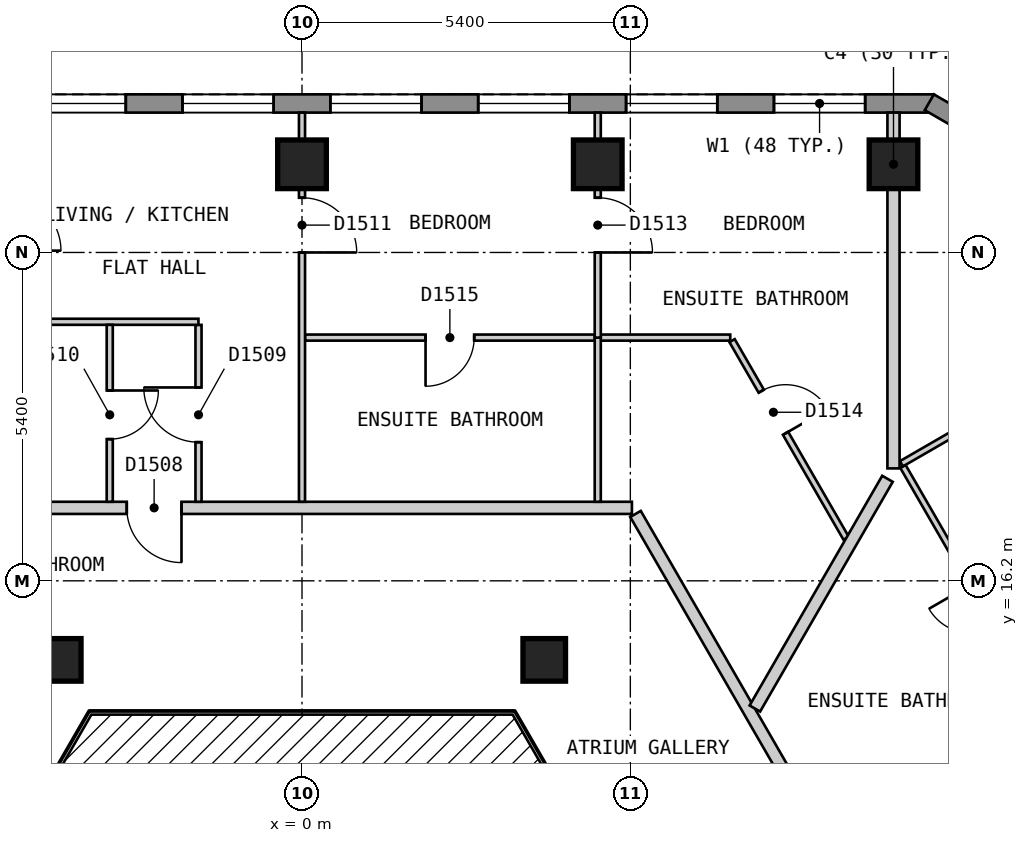
"""IFC4 building model, lengths in metres.
Left out: names, types, materials, properties, quantities, classifications, styles, units other than length and angle.
Written with IfcOpenShell. Run it as: python <this file> out.ifc"""

import sys

from ifc_helpers import new_model, si_unit, direction, frame, frame_2d, origin, origin_2d, place, context, subcontext, project, spatial, polyline, rectangle, outline, extrude, element, fill, save


model = new_model("IFC4")
c1 = context("Model", 3, precision=1e-05, world=origin(), true_north=direction((0.0, 1.0)))
c2 = subcontext(c1, "Body", "Model", "MODEL_VIEW")
j1 = project(units=[si_unit("LENGTHUNIT", "METRE"), si_unit("PLANEANGLEUNIT", "RADIAN")], contexts=[c1])
p1 = place(None, origin())
s1 = spatial("IfcSite", under=j1, at=p1, CompositionType="ELEMENT")
p2 = place(p1, origin())
s2 = spatial("IfcBuilding", under=s1, at=p2, CompositionType="ELEMENT")
p3 = place(p2, frame((0.0, 0.0, 190.2)))
s3 = spatial("IfcBuildingStorey", under=s2, at=p3, CompositionType="ELEMENT", Elevation=190.2)
for number, where, z_axis, x_axis in (
    (1, (9.728, 23.05, 0.0), (0.0, 0.0, 1.0), (-1.0, 0.0, 0.0)),
    (2, (4.864, 23.05, 0.0), (0.0, 0.0, 1.0), (-1.0, 0.0, 0.0)),
    (3, (0.0, 23.05, 0.0), (0.0, 0.0, 1.0), (-1.0, 0.0, 0.0)),
):
    element("IfcColumn", number, at=place(p3, frame(where, z_axis=z_axis, x_axis=x_axis)), inside=s3, PredefinedType="COLUMN", context=c2, shape_type="SweptSolid", body=[
        extrude(rectangle(XDim=0.8, YDim=0.8, at=origin_2d()), origin(), (0.0, 0.0, 1.0), 3.0),
    ])
for number, where, z_axis, x_axis in (
    (4, (3.984, 14.9, 0.0), (0.0, 0.0, 1.0), (1.0, 0.0, 0.0)),
    (5, (-3.984, 14.9, 0.0), (0.0, 0.0, 1.0), (1.0, 0.0, 0.0)),
):
    element("IfcColumn", number, at=place(p3, frame(where, z_axis=z_axis, x_axis=x_axis)), inside=s3, PredefinedType="COLUMN", context=c2, shape_type="SweptSolid", body=[
        extrude(rectangle(XDim=0.7, YDim=0.7, at=origin_2d()), origin(), (0.0, 0.0, 1.0), 3.0),
    ])
p4 = place(p3, frame((10.392, 24.05, 0.0), z_axis=(0.0, 0.0, 1.0), x_axis=(-1.0, 0.0, 0.0)))
e6 = element("IfcWall", 6, at=p4, inside=s3, PredefinedType="SOLIDWALL", context=c2, shape_type="SweptSolid", body=[
    extrude(outline(polyline([(0.0, -0.15), (20.784, -0.15), (20.704, 0.15), (0.08, 0.15), (0.0, -0.15)])), origin(), (0.0, 0.0, 1.0), 2.7),
])
p5 = place(p4, frame((1.13, 0.0, 0.15)))
e7 = element("IfcOpeningElement", 7, at=p5, cuts=e6, PredefinedType="OPENING", context=c2, shape_type="SweptSolid", body=[
    extrude(rectangle(XDim=1.5, YDim=2.1, at=frame_2d((0.75, 1.05))), frame((0.0, 0.16, 0.0), z_axis=(0.0, -1.0, 0.0), x_axis=(1.0, 0.0, 0.0)), (0.0, 0.0, 1.0), 0.32),
])
p6 = place(p4, frame((3.562, 0.0, 0.15)))
e8 = element("IfcOpeningElement", 8, at=p6, cuts=e6, PredefinedType="OPENING", context=c2, shape_type="SweptSolid", body=[
    extrude(rectangle(XDim=1.5, YDim=2.1, at=frame_2d((0.75, 1.05))), frame((0.0, 0.16, 0.0), z_axis=(0.0, -1.0, 0.0), x_axis=(1.0, 0.0, 0.0)), (0.0, 0.0, 1.0), 0.32),
])
p7 = place(p4, frame((5.994, 0.0, 0.15)))
e9 = element("IfcOpeningElement", 9, at=p7, cuts=e6, PredefinedType="OPENING", context=c2, shape_type="SweptSolid", body=[
    extrude(rectangle(XDim=1.5, YDim=2.1, at=frame_2d((0.75, 1.05))), frame((0.0, 0.16, 0.0), z_axis=(0.0, -1.0, 0.0), x_axis=(1.0, 0.0, 0.0)), (0.0, 0.0, 1.0), 0.32),
])
p8 = place(p4, frame((8.426, 0.0, 0.15)))
e10 = element("IfcOpeningElement", 10, at=p8, cuts=e6, PredefinedType="OPENING", context=c2, shape_type="SweptSolid", body=[
    extrude(rectangle(XDim=1.5, YDim=2.1, at=frame_2d((0.75, 1.05))), frame((0.0, 0.16, 0.0), z_axis=(0.0, -1.0, 0.0), x_axis=(1.0, 0.0, 0.0)), (0.0, 0.0, 1.0), 0.32),
])
p9 = place(p4, frame((10.858, 0.0, 0.15)))
e11 = element("IfcOpeningElement", 11, at=p9, cuts=e6, PredefinedType="OPENING", context=c2, shape_type="SweptSolid", body=[
    extrude(rectangle(XDim=1.5, YDim=2.1, at=frame_2d((0.75, 1.05))), frame((0.0, 0.16, 0.0), z_axis=(0.0, -1.0, 0.0), x_axis=(1.0, 0.0, 0.0)), (0.0, 0.0, 1.0), 0.32),
])
p10 = place(p4, frame((13.29, 0.0, 0.15)))
e12 = element("IfcOpeningElement", 12, at=p10, cuts=e6, PredefinedType="OPENING", context=c2, shape_type="SweptSolid", body=[
    extrude(rectangle(XDim=1.5, YDim=2.1, at=frame_2d((0.75, 1.05))), frame((0.0, 0.16, 0.0), z_axis=(0.0, -1.0, 0.0), x_axis=(1.0, 0.0, 0.0)), (0.0, 0.0, 1.0), 0.32),
])
p11 = place(p4, frame((15.722, 0.0, 0.15)))
e13 = element("IfcOpeningElement", 13, at=p11, cuts=e6, PredefinedType="OPENING", context=c2, shape_type="SweptSolid", body=[
    extrude(rectangle(XDim=1.5, YDim=2.1, at=frame_2d((0.75, 1.05))), frame((0.0, 0.16, 0.0), z_axis=(0.0, -1.0, 0.0), x_axis=(1.0, 0.0, 0.0)), (0.0, 0.0, 1.0), 0.32),
])
p12 = place(p4, frame((18.154, 0.0, 0.15)))
e14 = element("IfcOpeningElement", 14, at=p12, cuts=e6, PredefinedType="OPENING", context=c2, shape_type="SweptSolid", body=[
    extrude(rectangle(XDim=1.5, YDim=2.1, at=frame_2d((0.75, 1.05))), frame((0.0, 0.16, 0.0), z_axis=(0.0, -1.0, 0.0), x_axis=(1.0, 0.0, 0.0)), (0.0, 0.0, 1.0), 0.32),
])
p13 = place(p3, frame((14.647, 21.57, 0.0), z_axis=(0.0, 0.0, 1.0), x_axis=(-0.866022959057, 0.500004234368, 0.0)))
e15 = element("IfcWall", 15, at=p13, inside=s3, PredefinedType="SOLIDWALL", context=c2, shape_type="SweptSolid", body=[
    extrude(outline(polyline([(0.0, -0.15), (5.0, -0.15), (4.92, 0.15), (0.08, 0.15), (0.0, -0.15)])), origin(), (0.0, 0.0, 1.0), 2.7),
])
p14 = place(p13, frame((0.65, 0.0, 0.15)))
e16 = element("IfcOpeningElement", 16, at=p14, cuts=e15, PredefinedType="OPENING", context=c2, shape_type="SweptSolid", body=[
    extrude(rectangle(XDim=1.2, YDim=2.1, at=frame_2d((0.6, 1.05))), frame((0.0, 0.16, 0.0), z_axis=(0.0, -1.0, 0.0), x_axis=(1.0, 0.0, 0.0)), (0.0, 0.0, 1.0), 0.32),
])
p15 = place(p13, frame((3.15, 0.0, 0.15)))
e17 = element("IfcOpeningElement", 17, at=p15, cuts=e15, PredefinedType="OPENING", context=c2, shape_type="SweptSolid", body=[
    extrude(rectangle(XDim=1.2, YDim=2.1, at=frame_2d((0.6, 1.05))), frame((0.0, 0.16, 0.0), z_axis=(0.0, -1.0, 0.0), x_axis=(1.0, 0.0, 0.0)), (0.0, 0.0, 1.0), 0.32),
])
p16 = place(p3, frame((5.485, 17.3, 0.0), z_axis=(0.0, 0.0, 1.0), x_axis=(0.499998905622, -0.866026035623, 0.0)))
e18 = element("IfcWall", 18, at=p16, inside=s3, PredefinedType="PARTITIONING", context=c2, shape_type="SweptSolid", body=[
    extrude(rectangle(XDim=10.524, YDim=0.2, at=frame_2d((5.262, 0.0))), origin(), (0.0, 0.0, 1.0), 2.7),
])
p17 = place(p16, frame((8.974, 0.0, 0.0)))
e19 = element("IfcOpeningElement", 19, at=p17, cuts=e18, PredefinedType="OPENING", context=c2, shape_type="SweptSolid", body=[
    extrude(rectangle(XDim=1.0, YDim=2.1, at=frame_2d((0.5, 1.05))), frame((0.0, 0.11, 0.0), z_axis=(0.0, -1.0, 0.0), x_axis=(1.0, 0.0, 0.0)), (0.0, 0.0, 1.0), 0.22),
])
p18 = place(p3, frame((-5.311, 17.4, 0.0), z_axis=(0.0, 0.0, 1.0), x_axis=(1.0, 0.0, 0.0)))
e20 = element("IfcWall", 20, at=p18, inside=s3, PredefinedType="PARTITIONING", context=c2, shape_type="SweptSolid", body=[
    extrude(rectangle(XDim=10.737, YDim=0.2, at=frame_2d((5.369, 0.0))), origin(), (0.0, 0.0, 1.0), 2.7),
])
p19 = place(p18, frame((2.429, 0.0, 0.0)))
e21 = element("IfcOpeningElement", 21, at=p19, cuts=e20, PredefinedType="OPENING", context=c2, shape_type="SweptSolid", body=[
    extrude(rectangle(XDim=0.9, YDim=2.1, at=frame_2d((0.45, 1.05))), frame((0.0, 0.11, 0.0), z_axis=(0.0, -1.0, 0.0), x_axis=(1.0, 0.0, 0.0)), (0.0, 0.0, 1.0), 0.22),
])
p20 = place(p3, frame((7.073, 20.15, 0.0), z_axis=(0.0, 0.0, 1.0), x_axis=(0.499917691695, -0.866072919292, 0.0)))
e22 = element("IfcWall", 22, at=p20, inside=s3, PredefinedType="PARTITIONING", context=c2, shape_type="SweptSolid", body=[
    extrude(rectangle(XDim=3.753, YDim=0.1, at=frame_2d((1.876, 0.0))), origin(), (0.0, 0.0, 1.0), 2.7),
])
p21 = place(p20, frame((0.96, 0.0, 0.0)))
e23 = element("IfcOpeningElement", 23, at=p21, cuts=e22, PredefinedType="OPENING", context=c2, shape_type="SweptSolid", body=[
    extrude(rectangle(XDim=0.8, YDim=2.1, at=frame_2d((0.4, 1.05))), frame((0.0, 0.06, 0.0), z_axis=(0.0, -1.0, 0.0), x_axis=(1.0, 0.0, 0.0)), (0.0, 0.0, 1.0), 0.12),
])
p22 = place(p3, frame((9.883, 18.082, 0.0), z_axis=(0.0, 0.0, 1.0), x_axis=(0.500004428835, -0.86602284678, 0.0)))
e24 = element("IfcWall", 24, at=p22, inside=s3, PredefinedType="PARTITIONING", context=c2, shape_type="SweptSolid", body=[
    extrude(rectangle(XDim=10.618, YDim=0.1, at=frame_2d((5.309, 0.0))), origin(), (0.0, 0.0, 1.0), 2.7),
])
p23 = place(p22, frame((7.657, 0.0, 0.0)))
e25 = element("IfcOpeningElement", 25, at=p23, cuts=e24, PredefinedType="OPENING", context=c2, shape_type="SweptSolid", body=[
    extrude(rectangle(XDim=0.9, YDim=2.1, at=frame_2d((0.45, 1.05))), frame((0.0, 0.06, 0.0), z_axis=(0.0, -1.0, 0.0), x_axis=(1.0, 0.0, 0.0)), (0.0, 0.0, 1.0), 0.12),
])
p24 = place(p22, frame((2.242, 0.0, 0.0)))
e26 = element("IfcOpeningElement", 26, at=p24, cuts=e24, PredefinedType="OPENING", context=c2, shape_type="SweptSolid", body=[
    extrude(rectangle(XDim=0.8, YDim=2.1, at=frame_2d((0.4, 1.05))), frame((0.0, 0.06, 0.0), z_axis=(0.0, -1.0, 0.0), x_axis=(1.0, 0.0, 0.0)), (0.0, 0.0, 1.0), 0.12),
])
p25 = place(p3, frame((-1.702, 20.409, 0.0), z_axis=(0.0, 0.0, 1.0), x_axis=(0.0, -1.0, 0.0)))
e27 = element("IfcWall", 27, at=p25, inside=s3, PredefinedType="PARTITIONING", context=c2, shape_type="SweptSolid", body=[
    extrude(rectangle(XDim=2.909, YDim=0.1, at=frame_2d((1.455, 0.0))), origin(), (0.0, 0.0, 1.0), 2.7),
])
p26 = place(p25, frame((1.029, 0.0, 0.0)))
e28 = element("IfcOpeningElement", 28, at=p26, cuts=e27, PredefinedType="OPENING", context=c2, shape_type="SweptSolid", body=[
    extrude(rectangle(XDim=0.9, YDim=2.1, at=frame_2d((0.45, 1.05))), frame((0.0, 0.06, 0.0), z_axis=(0.0, -1.0, 0.0), x_axis=(1.0, 0.0, 0.0)), (0.0, 0.0, 1.0), 0.12),
])
p27 = place(p3, frame((0.05, 20.2, 0.0), z_axis=(0.0, 0.0, 1.0), x_axis=(1.0, 0.0, 0.0)))
e29 = element("IfcWall", 29, at=p27, inside=s3, PredefinedType="PARTITIONING", context=c2, shape_type="SweptSolid", body=[
    extrude(rectangle(XDim=6.993, YDim=0.1, at=frame_2d((3.497, 0.0))), origin(), (0.0, 0.0, 1.0), 2.7),
])
p28 = place(p27, frame((1.982, 0.0, 0.0)))
e30 = element("IfcOpeningElement", 30, at=p28, cuts=e29, PredefinedType="OPENING", context=c2, shape_type="SweptSolid", body=[
    extrude(rectangle(XDim=0.8, YDim=2.1, at=frame_2d((0.4, 1.05))), frame((0.0, 0.06, 0.0), z_axis=(0.0, -1.0, 0.0), x_axis=(1.0, 0.0, 0.0)), (0.0, 0.0, 1.0), 0.12),
])
p29 = place(p3, frame((-4.814, 20.46, 0.0), z_axis=(0.0, 0.0, 1.0), x_axis=(1.0, 0.0, 0.0)))
e31 = element("IfcWall", 31, at=p29, inside=s3, PredefinedType="PARTITIONING", context=c2, shape_type="SweptSolid", body=[
    extrude(rectangle(XDim=3.111, YDim=0.1, at=frame_2d((1.556, 0.0))), origin(), (0.0, 0.0, 1.0), 2.7),
])
p30 = place(p3, frame((4.864, 17.5, 0.0), z_axis=(0.0, 0.0, 1.0), x_axis=(0.0, 1.0, 0.0)))
e32 = element("IfcWall", 32, at=p30, inside=s3, PredefinedType="PARTITIONING", context=c2, shape_type="SweptSolid", body=[
    extrude(rectangle(XDim=2.7, YDim=0.1, at=frame_2d((1.35, 0.0))), origin(), (0.0, 0.0, 1.0), 2.7),
])
p31 = place(p3, frame((0.0, 17.5, 0.0), z_axis=(0.0, 0.0, 1.0), x_axis=(0.0, 1.0, 0.0)))
e33 = element("IfcWall", 33, at=p31, inside=s3, PredefinedType="PARTITIONING", context=c2, shape_type="SweptSolid", body=[
    extrude(rectangle(XDim=6.4, YDim=0.1, at=frame_2d((3.2, 0.0))), origin(), (0.0, 0.0, 1.0), 2.7),
])
p32 = place(p31, frame((4.1, 0.0, 0.0)))
e34 = element("IfcOpeningElement", 34, at=p32, cuts=e33, PredefinedType="OPENING", context=c2, shape_type="SweptSolid", body=[
    extrude(rectangle(XDim=0.9, YDim=2.1, at=frame_2d((0.45, 1.05))), frame((0.0, 0.06, 0.0), z_axis=(0.0, -1.0, 0.0), x_axis=(1.0, 0.0, 0.0)), (0.0, 0.0, 1.0), 0.12),
])
p33 = place(p3, frame((-3.162, 17.5, 0.0), z_axis=(0.0, 0.0, 1.0), x_axis=(0.0, 1.0, 0.0)))
e35 = element("IfcWall", 35, at=p33, inside=s3, PredefinedType="PARTITIONING", context=c2, shape_type="SweptSolid", body=[
    extrude(rectangle(XDim=2.91, YDim=0.1, at=frame_2d((1.455, 0.0))), origin(), (0.0, 0.0, 1.0), 2.7),
])
p34 = place(p33, frame((1.03, 0.0, 0.0)))
e36 = element("IfcOpeningElement", 36, at=p34, cuts=e35, PredefinedType="OPENING", context=c2, shape_type="SweptSolid", body=[
    extrude(rectangle(XDim=0.8, YDim=2.1, at=frame_2d((0.4, 1.05))), frame((0.0, 0.06, 0.0), z_axis=(0.0, -1.0, 0.0), x_axis=(1.0, 0.0, 0.0)), (0.0, 0.0, 1.0), 0.12),
])
p35 = place(p3, frame((8.999, 11.413, 0.0), z_axis=(0.0, 0.0, 1.0), x_axis=(0.86606561423, 0.499930346997, 0.0)))
e37 = element("IfcWall", 37, at=p35, inside=s3, PredefinedType="PARTITIONING", context=c2, shape_type="SweptSolid", body=[
    extrude(rectangle(XDim=4.1, YDim=0.1, at=frame_2d((2.05, 0.0))), origin(), (0.0, 0.0, 1.0), 2.7),
])
p36 = place(p3, frame((9.858, 18.125, 0.0), z_axis=(0.0, 0.0, 1.0), x_axis=(0.866004402611, 0.500036373335, 0.0)))
e38 = element("IfcWall", 38, at=p36, inside=s3, PredefinedType="PARTITIONING", context=c2, shape_type="SweptSolid", body=[
    extrude(rectangle(XDim=5.7, YDim=0.1, at=frame_2d((2.85, 0.0))), origin(), (0.0, 0.0, 1.0), 2.7),
])
p37 = place(p36, frame((2.4, 0.0, 0.0)))
e39 = element("IfcOpeningElement", 39, at=p37, cuts=e38, PredefinedType="OPENING", context=c2, shape_type="SweptSolid", body=[
    extrude(rectangle(XDim=0.9, YDim=2.1, at=frame_2d((0.45, 1.05))), frame((0.0, 0.06, 0.0), z_axis=(0.0, -1.0, 0.0), x_axis=(1.0, 0.0, 0.0)), (0.0, 0.0, 1.0), 0.12),
])
p38 = place(p3, frame((7.448, 14.1, 0.0), z_axis=(0.0, 0.0, 1.0), x_axis=(0.499961462843, 0.866047652079, 0.0)))
e40 = element("IfcWall", 40, at=p38, inside=s3, PredefinedType="PARTITIONING", context=c2, shape_type="SweptSolid", body=[
    extrude(rectangle(XDim=4.362, YDim=0.2, at=frame_2d((2.181, 0.0))), origin(), (0.0, 0.0, 1.0), 2.7),
])
p39 = place(p3, frame((9.728, 18.049, 0.0), z_axis=(0.0, 0.0, 1.0), x_axis=(0.0, 1.0, 0.0)))
e41 = element("IfcWall", 41, at=p39, inside=s3, PredefinedType="PARTITIONING", context=c2, shape_type="SweptSolid", body=[
    extrude(rectangle(XDim=5.851, YDim=0.2, at=frame_2d((2.925, 0.0))), origin(), (0.0, 0.0, 1.0), 2.7),
])
p40 = place(p3, frame((4.864, 20.2, 0.0), z_axis=(0.0, 0.0, 1.0), x_axis=(0.0, 1.0, 0.0)))
e42 = element("IfcWall", 42, at=p40, inside=s3, PredefinedType="PARTITIONING", context=c2, shape_type="SweptSolid", body=[
    extrude(rectangle(XDim=3.7, YDim=0.1, at=frame_2d((1.85, 0.0))), origin(), (0.0, 0.0, 1.0), 2.7),
])
p41 = place(p40, frame((1.4, 0.0, 0.0)))
e43 = element("IfcOpeningElement", 43, at=p41, cuts=e42, PredefinedType="OPENING", context=c2, shape_type="SweptSolid", body=[
    extrude(rectangle(XDim=0.9, YDim=2.1, at=frame_2d((0.45, 1.05))), frame((0.0, 0.06, 0.0), z_axis=(0.0, -1.0, 0.0), x_axis=(1.0, 0.0, 0.0)), (0.0, 0.0, 1.0), 0.12),
])
p42 = place(p5, origin())
e44 = element("IfcWindow", 44, at=p42, inside=s3, PartitioningType="SINGLE_PANEL", PredefinedType="WINDOW", context=c2, shape_type="SweptSolid", body=[
    extrude(rectangle(XDim=1.5, YDim=2.1, at=frame_2d((0.75, 1.05))), frame((0.0, 0.03, 0.0), z_axis=(0.0, -1.0, 0.0), x_axis=(1.0, 0.0, 0.0)), (0.0, 0.0, 1.0), 0.06),
])
fill(e7, e44)
p43 = place(p6, origin())
e45 = element("IfcWindow", 45, at=p43, inside=s3, PartitioningType="SINGLE_PANEL", PredefinedType="WINDOW", context=c2, shape_type="SweptSolid", body=[
    extrude(rectangle(XDim=1.5, YDim=2.1, at=frame_2d((0.75, 1.05))), frame((0.0, 0.03, 0.0), z_axis=(0.0, -1.0, 0.0), x_axis=(1.0, 0.0, 0.0)), (0.0, 0.0, 1.0), 0.06),
])
fill(e8, e45)
p44 = place(p7, origin())
e46 = element("IfcWindow", 46, at=p44, inside=s3, PartitioningType="SINGLE_PANEL", PredefinedType="WINDOW", context=c2, shape_type="SweptSolid", body=[
    extrude(rectangle(XDim=1.5, YDim=2.1, at=frame_2d((0.75, 1.05))), frame((0.0, 0.03, 0.0), z_axis=(0.0, -1.0, 0.0), x_axis=(1.0, 0.0, 0.0)), (0.0, 0.0, 1.0), 0.06),
])
fill(e9, e46)
p45 = place(p8, origin())
e47 = element("IfcWindow", 47, at=p45, inside=s3, PartitioningType="SINGLE_PANEL", PredefinedType="WINDOW", context=c2, shape_type="SweptSolid", body=[
    extrude(rectangle(XDim=1.5, YDim=2.1, at=frame_2d((0.75, 1.05))), frame((0.0, 0.03, 0.0), z_axis=(0.0, -1.0, 0.0), x_axis=(1.0, 0.0, 0.0)), (0.0, 0.0, 1.0), 0.06),
])
fill(e10, e47)
p46 = place(p9, origin())
e48 = element("IfcWindow", 48, at=p46, inside=s3, PartitioningType="SINGLE_PANEL", PredefinedType="WINDOW", context=c2, shape_type="SweptSolid", body=[
    extrude(rectangle(XDim=1.5, YDim=2.1, at=frame_2d((0.75, 1.05))), frame((0.0, 0.03, 0.0), z_axis=(0.0, -1.0, 0.0), x_axis=(1.0, 0.0, 0.0)), (0.0, 0.0, 1.0), 0.06),
])
fill(e11, e48)
p47 = place(p10, origin())
e49 = element("IfcWindow", 49, at=p47, inside=s3, PartitioningType="SINGLE_PANEL", PredefinedType="WINDOW", context=c2, shape_type="SweptSolid", body=[
    extrude(rectangle(XDim=1.5, YDim=2.1, at=frame_2d((0.75, 1.05))), frame((0.0, 0.03, 0.0), z_axis=(0.0, -1.0, 0.0), x_axis=(1.0, 0.0, 0.0)), (0.0, 0.0, 1.0), 0.06),
])
fill(e12, e49)
p48 = place(p19, origin())
e50 = element("IfcDoor", 50, at=p48, inside=s3, OperationType="SINGLE_SWING_RIGHT", PredefinedType="DOOR", context=c2, shape_type="SweptSolid", body=[
    extrude(rectangle(XDim=0.9, YDim=2.1, at=frame_2d((0.45, 1.05))), frame((0.0, 0.025, 0.0), z_axis=(0.0, -1.0, 0.0), x_axis=(1.0, 0.0, 0.0)), (0.0, 0.0, 1.0), 0.05),
])
fill(e21, e50)
p49 = place(p26, origin())
e51 = element("IfcDoor", 51, at=p49, inside=s3, OperationType="SINGLE_SWING_LEFT", PredefinedType="DOOR", context=c2, shape_type="SweptSolid", body=[
    extrude(rectangle(XDim=0.9, YDim=2.1, at=frame_2d((0.45, 1.05))), frame((0.0, 0.025, 0.0), z_axis=(0.0, -1.0, 0.0), x_axis=(1.0, 0.0, 0.0)), (0.0, 0.0, 1.0), 0.05),
])
fill(e28, e51)
p50 = place(p34, origin())
e52 = element("IfcDoor", 52, at=p50, inside=s3, OperationType="SINGLE_SWING_RIGHT", PredefinedType="DOOR", context=c2, shape_type="SweptSolid", body=[
    extrude(rectangle(XDim=0.8, YDim=2.1, at=frame_2d((0.4, 1.05))), frame((0.0, 0.025, 0.0), z_axis=(0.0, -1.0, 0.0), x_axis=(1.0, 0.0, 0.0)), (0.0, 0.0, 1.0), 0.05),
])
fill(e36, e52)
p51 = place(p32, origin())
e53 = element("IfcDoor", 53, at=p51, inside=s3, OperationType="SINGLE_SWING_LEFT", PredefinedType="DOOR", context=c2, shape_type="SweptSolid", body=[
    extrude(rectangle(XDim=0.9, YDim=2.1, at=frame_2d((0.45, 1.05))), frame((0.0, 0.025, 0.0), z_axis=(0.0, -1.0, 0.0), x_axis=(1.0, 0.0, 0.0)), (0.0, 0.0, 1.0), 0.05),
])
fill(e34, e53)
p52 = place(p41, origin())
e54 = element("IfcDoor", 54, at=p52, inside=s3, OperationType="SINGLE_SWING_LEFT", PredefinedType="DOOR", context=c2, shape_type="SweptSolid", body=[
    extrude(rectangle(XDim=0.9, YDim=2.1, at=frame_2d((0.45, 1.05))), frame((0.0, 0.025, 0.0), z_axis=(0.0, -1.0, 0.0), x_axis=(1.0, 0.0, 0.0)), (0.0, 0.0, 1.0), 0.05),
])
fill(e43, e54)
p53 = place(p21, origin())
e55 = element("IfcDoor", 55, at=p53, inside=s3, OperationType="SINGLE_SWING_RIGHT", PredefinedType="DOOR", context=c2, shape_type="SweptSolid", body=[
    extrude(rectangle(XDim=0.8, YDim=2.1, at=frame_2d((0.4, 1.05))), frame((0.0, 0.025, 0.0), z_axis=(0.0, -1.0, 0.0), x_axis=(1.0, 0.0, 0.0)), (0.0, 0.0, 1.0), 0.05),
])
fill(e23, e55)
p54 = place(p28, origin())
e56 = element("IfcDoor", 56, at=p54, inside=s3, OperationType="SINGLE_SWING_LEFT", PredefinedType="DOOR", context=c2, shape_type="SweptSolid", body=[
    extrude(rectangle(XDim=0.8, YDim=2.1, at=frame_2d((0.4, 1.05))), frame((0.0, 0.025, 0.0), z_axis=(0.0, -1.0, 0.0), x_axis=(1.0, 0.0, 0.0)), (0.0, 0.0, 1.0), 0.05),
])
fill(e30, e56)
save(model, sys.argv[1])
